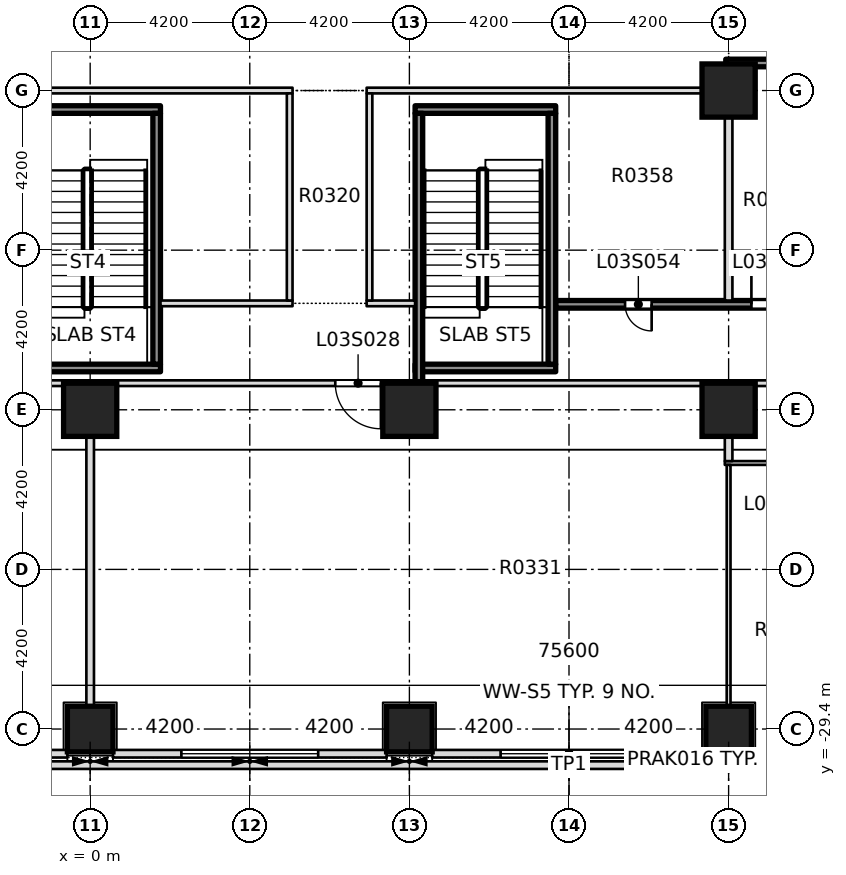
"""IFC4 building model, lengths in metres.
Left out: names, types, materials, properties, quantities, classifications, styles, units other than length and angle.
Written with IfcOpenShell. Run it as: python <this file> out.ifc"""

import sys

from ifc_helpers import new_model, si_unit, direction, frame, frame_2d, origin, origin_2d, place, context, subcontext, project, spatial, rectangle, extrude, element, fill, save


model = new_model("IFC4")
c1 = context("Model", 3, precision=1e-05, world=origin(), true_north=direction((0.0, 1.0)))
c2 = subcontext(c1, "Body", "Model", "MODEL_VIEW")
j1 = project(units=[si_unit("LENGTHUNIT", "METRE"), si_unit("PLANEANGLEUNIT", "RADIAN")], contexts=[c1])
p1 = place(None, origin())
s1 = spatial("IfcSite", under=j1, at=p1, CompositionType="ELEMENT")
p2 = place(p1, origin())
s2 = spatial("IfcBuilding", under=s1, at=p2, CompositionType="ELEMENT")
p3 = place(p2, frame((0.0, 0.0, 20.0)))
s3 = spatial("IfcBuildingStorey", under=s2, at=p3, CompositionType="ELEMENT", Elevation=20.0)
for number, where, z_axis, x_axis in (
    (1, (0.0, -21.0, -0.4), (0.0, 0.0, 1.0), (1.0, 0.0, 0.0)),
    (2, (8.4, -21.0, -0.4), (0.0, 0.0, 1.0), (1.0, 0.0, 0.0)),
    (3, (16.8, -21.0, -0.4), (0.0, 0.0, 1.0), (1.0, 0.0, 0.0)),
    (4, (16.8, -12.6, -0.4), (0.0, 0.0, 1.0), (1.0, 0.0, 0.0)),
):
    element("IfcColumn", number, at=place(p3, frame(where, z_axis=z_axis, x_axis=x_axis)), inside=s3, PredefinedType="COLUMN", context=c2, shape_type="SweptSolid", body=[
        extrude(rectangle(XDim=1.4, YDim=1.4, at=origin_2d()), origin(), (0.0, 0.0, 1.0), 5.0),
    ])
for number, where, z_axis, x_axis in (
    (5, (0.0, -29.4, 0.0), (0.0, 0.0, 1.0), (1.0, 0.0, 0.0)),
    (6, (8.4, -29.4, 0.0), (0.0, 0.0, 1.0), (1.0, 0.0, 0.0)),
    (7, (16.8, -29.4, 0.0), (0.0, 0.0, 1.0), (1.0, 0.0, 0.0)),
):
    element("IfcColumn", number, at=place(p3, frame(where, z_axis=z_axis, x_axis=x_axis)), inside=s3, PredefinedType="COLUMN", context=c2, shape_type="SweptSolid", body=[
        extrude(rectangle(XDim=1.2, YDim=1.2, at=origin_2d()), origin(), (0.0, 0.0, 1.0), 4.6),
    ])
p4 = place(p3, frame((-26.25, -30.35, 5.0), z_axis=(0.0, 0.0, 1.0), x_axis=(1.0, 0.0, 0.0)))
e8 = element("IfcWall", 8, at=p4, inside=s3, PredefinedType="PARAPET", context=c2, shape_type="SweptSolid", body=[
    extrude(rectangle(XDim=77.7, YDim=0.2, at=frame_2d((38.85, 0.0))), origin(), (0.0, 0.0, 1.0), 1.2),
])
p5 = place(p3, frame((16.7, -22.4, 0.0), z_axis=(0.0, 0.0, 1.0), x_axis=(1.0, 0.0, 0.0)))
e9 = element("IfcWall", 9, at=p5, inside=s3, PredefinedType="PARTITIONING", context=c2, shape_type="SweptSolid", body=[
    extrude(rectangle(XDim=8.6, YDim=0.1, at=frame_2d((4.3, 0.0))), origin(), (0.0, 0.0, 1.0), 4.6),
])
p6 = place(p5, frame((1.15, 0.0, 0.0)))
e10 = element("IfcOpeningElement", 10, at=p6, cuts=e9, PredefinedType="OPENING", context=c2, shape_type="SweptSolid", body=[
    extrude(rectangle(XDim=0.9, YDim=2.1, at=frame_2d((0.45, 1.05))), frame((0.0, 0.06, 0.0), z_axis=(0.0, -1.0, 0.0), x_axis=(1.0, 0.0, 0.0)), (0.0, 0.0, 1.0), 0.12),
])
p7 = place(p5, frame((4.15, 0.0, 0.0)))
e11 = element("IfcOpeningElement", 11, at=p7, cuts=e9, PredefinedType="OPENING", context=c2, shape_type="SweptSolid", body=[
    extrude(rectangle(XDim=0.9, YDim=2.1, at=frame_2d((0.45, 1.05))), frame((0.0, 0.06, 0.0), z_axis=(0.0, -1.0, 0.0), x_axis=(1.0, 0.0, 0.0)), (0.0, 0.0, 1.0), 0.12),
])
p8 = place(p5, frame((6.85, 0.0, 0.0)))
e12 = element("IfcOpeningElement", 12, at=p8, cuts=e9, PredefinedType="OPENING", context=c2, shape_type="SweptSolid", body=[
    extrude(rectangle(XDim=0.9, YDim=2.1, at=frame_2d((0.45, 1.05))), frame((0.0, 0.06, 0.0), z_axis=(0.0, -1.0, 0.0), x_axis=(1.0, 0.0, 0.0)), (0.0, 0.0, 1.0), 0.12),
])
p9 = place(p3, frame((-25.75, -20.3, 0.0), z_axis=(0.0, 0.0, 1.0), x_axis=(1.0, 0.0, 0.0)))
e13 = element("IfcWall", 13, at=p9, inside=s3, PredefinedType="PARTITIONING", context=c2, shape_type="SweptSolid", body=[
    extrude(rectangle(XDim=59.425, YDim=0.15, at=frame_2d((29.712, 0.0))), origin(), (0.0, 0.0, 1.0), 4.6),
])
p10 = place(p9, frame((4.2, 0.0, 0.0)))
e14 = element("IfcOpeningElement", 14, at=p10, cuts=e13, PredefinedType="OPENING", context=c2, shape_type="SweptSolid", body=[
    extrude(rectangle(XDim=1.1, YDim=2.1, at=frame_2d((0.55, 1.05))), frame((0.0, 0.085, 0.0), z_axis=(0.0, -1.0, 0.0), x_axis=(1.0, 0.0, 0.0)), (0.0, 0.0, 1.0), 0.17),
])
p11 = place(p9, frame((12.35, 0.0, 0.0)))
e15 = element("IfcOpeningElement", 15, at=p11, cuts=e13, PredefinedType="OPENING", context=c2, shape_type="SweptSolid", body=[
    extrude(rectangle(XDim=0.9, YDim=2.1, at=frame_2d((0.45, 1.05))), frame((0.0, 0.085, 0.0), z_axis=(0.0, -1.0, 0.0), x_axis=(1.0, 0.0, 0.0)), (0.0, 0.0, 1.0), 0.17),
])
p12 = place(p9, frame((21.1, 0.0, 0.0)))
e16 = element("IfcOpeningElement", 16, at=p12, cuts=e13, PredefinedType="OPENING", context=c2, shape_type="SweptSolid", body=[
    extrude(rectangle(XDim=0.9, YDim=2.1, at=frame_2d((0.45, 1.05))), frame((0.0, 0.085, 0.0), z_axis=(0.0, -1.0, 0.0), x_axis=(1.0, 0.0, 0.0)), (0.0, 0.0, 1.0), 0.17),
])
p13 = place(p9, frame((32.2, 0.0, 0.0)))
e17 = element("IfcOpeningElement", 17, at=p13, cuts=e13, PredefinedType="OPENING", context=c2, shape_type="SweptSolid", body=[
    extrude(rectangle(XDim=1.2, YDim=2.1, at=frame_2d((0.6, 1.05))), frame((0.0, 0.085, 0.0), z_axis=(0.0, -1.0, 0.0), x_axis=(1.0, 0.0, 0.0)), (0.0, 0.0, 1.0), 0.17),
])
p14 = place(p9, frame((46.2, 0.0, 0.0)))
e18 = element("IfcOpeningElement", 18, at=p14, cuts=e13, PredefinedType="OPENING", context=c2, shape_type="SweptSolid", body=[
    extrude(rectangle(XDim=1.1, YDim=2.1, at=frame_2d((0.55, 1.05))), frame((0.0, 0.085, 0.0), z_axis=(0.0, -1.0, 0.0), x_axis=(1.0, 0.0, 0.0)), (0.0, 0.0, 1.0), 0.17),
])
p15 = place(p9, frame((54.7, 0.0, 0.0)))
e19 = element("IfcOpeningElement", 19, at=p15, cuts=e13, PredefinedType="OPENING", context=c2, shape_type="SweptSolid", body=[
    extrude(rectangle(XDim=0.9, YDim=2.1, at=frame_2d((0.45, 1.05))), frame((0.0, 0.085, 0.0), z_axis=(0.0, -1.0, 0.0), x_axis=(1.0, 0.0, 0.0)), (0.0, 0.0, 1.0), 0.17),
])
p16 = place(p3, frame((1.85, -18.2, 0.0), z_axis=(0.0, 0.0, 1.0), x_axis=(1.0, 0.0, 0.0)))
e20 = element("IfcWall", 20, at=p16, inside=s3, PredefinedType="PARTITIONING", context=c2, shape_type="SweptSolid", body=[
    extrude(rectangle(XDim=3.475, YDim=0.15, at=frame_2d((1.737, 0.0))), origin(), (0.0, 0.0, 1.0), 4.6),
])
p17 = place(p3, frame((7.275, -18.2, 0.0), z_axis=(0.0, 0.0, 1.0), x_axis=(1.0, 0.0, 0.0)))
e21 = element("IfcWall", 21, at=p17, inside=s3, PredefinedType="PARTITIONING", context=c2, shape_type="SweptSolid", body=[
    extrude(rectangle(XDim=1.275, YDim=0.15, at=frame_2d((0.638, 0.0))), origin(), (0.0, 0.0, 1.0), 4.6),
])
p18 = place(p3, frame((12.25, -18.225, 0.0), z_axis=(0.0, 0.0, 1.0), x_axis=(1.0, 0.0, 0.0)))
e22 = element("IfcWall", 22, at=p18, inside=s3, PredefinedType="SOLIDWALL", context=c2, shape_type="SweptSolid", body=[
    extrude(rectangle(XDim=24.0, YDim=0.2, at=frame_2d((12.0, 0.0))), origin(), (0.0, 0.0, 1.0), 4.6),
])
p19 = place(p18, frame((5.15, 0.0, 0.0)))
e23 = element("IfcOpeningElement", 23, at=p19, cuts=e22, PredefinedType="OPENING", context=c2, shape_type="SweptSolid", body=[
    extrude(rectangle(XDim=1.2, YDim=2.1, at=frame_2d((0.6, 1.05))), frame((0.0, 0.11, 0.0), z_axis=(0.0, -1.0, 0.0), x_axis=(1.0, 0.0, 0.0)), (0.0, 0.0, 1.0), 0.22),
])
p20 = place(p18, frame((14.637, 0.0, 0.0)))
e24 = element("IfcOpeningElement", 24, at=p20, cuts=e22, PredefinedType="OPENING", context=c2, shape_type="SweptSolid", body=[
    extrude(rectangle(XDim=0.9, YDim=2.1, at=frame_2d((0.45, 1.05))), frame((0.0, 0.11, 0.0), z_axis=(0.0, -1.0, 0.0), x_axis=(1.0, 0.0, 0.0)), (0.0, 0.0, 1.0), 0.22),
])
p21 = place(p18, frame((18.913, 0.0, 0.0)))
e25 = element("IfcOpeningElement", 25, at=p21, cuts=e22, PredefinedType="OPENING", context=c2, shape_type="SweptSolid", body=[
    extrude(rectangle(XDim=0.9, YDim=2.1, at=frame_2d((0.45, 1.05))), frame((0.0, 0.11, 0.0), z_axis=(0.0, -1.0, 0.0), x_axis=(1.0, 0.0, 0.0)), (0.0, 0.0, 1.0), 0.22),
])
p22 = place(p18, frame((22.25, 0.0, 0.0)))
e26 = element("IfcOpeningElement", 26, at=p22, cuts=e22, PredefinedType="OPENING", context=c2, shape_type="SweptSolid", body=[
    extrude(rectangle(XDim=0.9, YDim=2.1, at=frame_2d((0.45, 1.05))), frame((0.0, 0.11, 0.0), z_axis=(0.0, -1.0, 0.0), x_axis=(1.0, 0.0, 0.0)), (0.0, 0.0, 1.0), 0.22),
])
p23 = place(p18, frame((1.825, 0.0, 0.0)))
e27 = element("IfcOpeningElement", 27, at=p23, cuts=e22, PredefinedType="OPENING", context=c2, shape_type="SweptSolid", body=[
    extrude(rectangle(XDim=0.7, YDim=2.1, at=frame_2d((0.35, 1.05))), frame((0.0, 0.11, 0.0), z_axis=(0.0, -1.0, 0.0), x_axis=(1.0, 0.0, 0.0)), (0.0, 0.0, 1.0), 0.22),
])
p24 = place(p3, frame((-5.325, -12.6, 0.0), z_axis=(0.0, 0.0, 1.0), x_axis=(1.0, 0.0, 0.0)))
e28 = element("IfcWall", 28, at=p24, inside=s3, PredefinedType="PARTITIONING", context=c2, shape_type="SweptSolid", body=[
    extrude(rectangle(XDim=10.65, YDim=0.15, at=frame_2d((5.325, 0.0))), origin(), (0.0, 0.0, 1.0), 4.6),
])
p25 = place(p3, frame((7.275, -12.6, 0.0), z_axis=(0.0, 0.0, 1.0), x_axis=(1.0, 0.0, 0.0)))
e29 = element("IfcWall", 29, at=p25, inside=s3, PredefinedType="PARTITIONING", context=c2, shape_type="SweptSolid", body=[
    extrude(rectangle(XDim=9.625, YDim=0.15, at=frame_2d((4.812, 0.0))), origin(), (0.0, 0.0, 1.0), 4.6),
])
p26 = place(p3, frame((16.725, -11.875, 0.0), z_axis=(0.0, 0.0, 1.0), x_axis=(1.0, 0.0, 0.0)))
e30 = element("IfcWall", 30, at=p26, inside=s3, PredefinedType="SOLIDWALL", context=c2, shape_type="SweptSolid", body=[
    extrude(rectangle(XDim=8.575, YDim=0.2, at=frame_2d((4.288, 0.0))), origin(), (0.0, 0.0, 1.0), 4.6),
])
p27 = place(p3, frame((0.0, -29.95, 0.0), z_axis=(0.0, 0.0, 1.0), x_axis=(0.0, 1.0, 0.0)))
e31 = element("IfcWall", 31, at=p27, inside=s3, PredefinedType="PARTITIONING", context=c2, shape_type="SweptSolid", body=[
    extrude(rectangle(XDim=9.575, YDim=0.2, at=frame_2d((4.788, 0.0))), origin(), (0.0, 0.0, 1.0), 4.6),
])
for number, where, z_axis, x_axis in (
    (32, (5.25, -18.125, 0.0), (0.0, 0.0, 1.0), (0.0, 1.0, 0.0)),
    (33, (7.35, -18.125, 0.0), (0.0, 0.0, 1.0), (0.0, 1.0, 0.0)),
):
    element("IfcWall", number, at=place(p3, frame(where, z_axis=z_axis, x_axis=x_axis)), inside=s3, PredefinedType="PARTITIONING", context=c2, shape_type="SweptSolid", body=[
        extrude(rectangle(XDim=5.45, YDim=0.15, at=frame_2d((2.725, 0.0))), origin(), (0.0, 0.0, 1.0), 4.6),
    ])
p28 = place(p3, frame((16.8, -29.95, 0.0), z_axis=(0.0, 0.0, 1.0), x_axis=(0.0, 1.0, 0.0)))
e34 = element("IfcWall", 34, at=p28, inside=s3, PredefinedType="PARTITIONING", context=c2, shape_type="SweptSolid", body=[
    extrude(rectangle(XDim=7.5, YDim=0.1, at=frame_2d((3.75, 0.0))), origin(), (0.0, 0.0, 1.0), 4.6),
])
p29 = place(p3, frame((16.8, -22.35, 0.0), z_axis=(0.0, 0.0, 1.0), x_axis=(0.0, 1.0, 0.0)))
e35 = element("IfcWall", 35, at=p29, inside=s3, PredefinedType="PARTITIONING", context=c2, shape_type="SweptSolid", body=[
    extrude(rectangle(XDim=1.975, YDim=0.2, at=frame_2d((0.988, 0.0))), origin(), (0.0, 0.0, 1.0), 4.6),
])
p30 = place(p3, frame((16.8, -18.125, 0.0), z_axis=(0.0, 0.0, 1.0), x_axis=(0.0, 1.0, 0.0)))
e36 = element("IfcWall", 36, at=p30, inside=s3, PredefinedType="PARTITIONING", context=c2, shape_type="SweptSolid", body=[
    extrude(rectangle(XDim=5.45, YDim=0.2, at=frame_2d((2.725, 0.0))), origin(), (0.0, 0.0, 1.0), 4.6),
])
p31 = place(p3, frame((16.8, -12.525, 0.0), z_axis=(0.0, 0.0, 1.0), x_axis=(0.0, 1.0, 0.0)))
e37 = element("IfcWall", 37, at=p31, inside=s3, PredefinedType="PARTITIONING", context=c2, shape_type="SweptSolid", body=[
    extrude(rectangle(XDim=0.55, YDim=0.15, at=frame_2d((0.275, 0.0))), origin(), (0.0, 0.0, 1.0), 4.6),
])
p32 = place(p3, frame((-7.8, -30.05, 0.0), z_axis=(0.0, 0.0, 1.0), x_axis=(1.0, 0.0, 0.0)))
e38 = element("IfcWall", 38, at=p32, inside=s3, PredefinedType="STANDARD", context=c2, shape_type="SweptSolid", body=[
    extrude(rectangle(XDim=7.2, YDim=0.2, at=frame_2d((3.6, 0.0))), origin(), (0.0, 0.0, 1.0), 4.6),
])
p33 = place(p32, frame((1.8, 0.0, 0.9)))
e39 = element("IfcOpeningElement", 39, at=p33, cuts=e38, PredefinedType="OPENING", context=c2, shape_type="SweptSolid", body=[
    extrude(rectangle(XDim=3.6, YDim=2.8, at=frame_2d((1.8, 1.4))), frame((0.0, 0.11, 0.0), z_axis=(0.0, -1.0, 0.0), x_axis=(1.0, 0.0, 0.0)), (0.0, 0.0, 1.0), 0.22),
])
p34 = place(p3, frame((0.6, -30.05, 0.0), z_axis=(0.0, 0.0, 1.0), x_axis=(1.0, 0.0, 0.0)))
e40 = element("IfcWall", 40, at=p34, inside=s3, PredefinedType="STANDARD", context=c2, shape_type="SweptSolid", body=[
    extrude(rectangle(XDim=7.2, YDim=0.2, at=frame_2d((3.6, 0.0))), origin(), (0.0, 0.0, 1.0), 4.6),
])
p35 = place(p34, frame((1.8, 0.0, 0.9)))
e41 = element("IfcOpeningElement", 41, at=p35, cuts=e40, PredefinedType="OPENING", context=c2, shape_type="SweptSolid", body=[
    extrude(rectangle(XDim=3.6, YDim=2.8, at=frame_2d((1.8, 1.4))), frame((0.0, 0.11, 0.0), z_axis=(0.0, -1.0, 0.0), x_axis=(1.0, 0.0, 0.0)), (0.0, 0.0, 1.0), 0.22),
])
p36 = place(p3, frame((9.0, -30.05, 0.0), z_axis=(0.0, 0.0, 1.0), x_axis=(1.0, 0.0, 0.0)))
e42 = element("IfcWall", 42, at=p36, inside=s3, PredefinedType="STANDARD", context=c2, shape_type="SweptSolid", body=[
    extrude(rectangle(XDim=7.2, YDim=0.2, at=frame_2d((3.6, 0.0))), origin(), (0.0, 0.0, 1.0), 4.6),
])
p37 = place(p36, frame((1.8, 0.0, 0.9)))
e43 = element("IfcOpeningElement", 43, at=p37, cuts=e42, PredefinedType="OPENING", context=c2, shape_type="SweptSolid", body=[
    extrude(rectangle(XDim=3.6, YDim=2.8, at=frame_2d((1.8, 1.4))), frame((0.0, 0.11, 0.0), z_axis=(0.0, -1.0, 0.0), x_axis=(1.0, 0.0, 0.0)), (0.0, 0.0, 1.0), 0.22),
])
p38 = place(p3, frame((17.4, -30.05, 0.0), z_axis=(0.0, 0.0, 1.0), x_axis=(1.0, 0.0, 0.0)))
e44 = element("IfcWall", 44, at=p38, inside=s3, PredefinedType="STANDARD", context=c2, shape_type="SweptSolid", body=[
    extrude(rectangle(XDim=7.2, YDim=0.2, at=frame_2d((3.6, 0.0))), origin(), (0.0, 0.0, 1.0), 4.6),
])
p39 = place(p38, frame((1.8, 0.0, 0.9)))
e45 = element("IfcOpeningElement", 45, at=p39, cuts=e44, PredefinedType="OPENING", context=c2, shape_type="SweptSolid", body=[
    extrude(rectangle(XDim=3.6, YDim=2.8, at=frame_2d((1.8, 1.4))), frame((0.0, 0.11, 0.0), z_axis=(0.0, -1.0, 0.0), x_axis=(1.0, 0.0, 0.0)), (0.0, 0.0, 1.0), 0.22),
])
for number, where, z_axis, x_axis in (
    (46, (-1.85, -19.9, 0.0), (0.0, 0.0, 1.0), (1.0, 0.0, 0.0)),
    (47, (-1.85, -13.1, 0.0), (0.0, 0.0, 1.0), (1.0, 0.0, 0.0)),
):
    element("IfcWall", number, at=place(p3, frame(where, z_axis=z_axis, x_axis=x_axis)), inside=s3, PredefinedType="SOLIDWALL", context=c2, shape_type="SweptSolid", body=[
        extrude(rectangle(XDim=3.7, YDim=0.2, at=frame_2d((1.85, 0.0))), origin(), (0.0, 0.0, 1.0), 4.6),
    ])
p40 = place(p3, frame((1.75, -19.8, 0.0), z_axis=(0.0, 0.0, 1.0), x_axis=(0.0, 1.0, 0.0)))
e48 = element("IfcWall", 48, at=p40, inside=s3, PredefinedType="SOLIDWALL", context=c2, shape_type="SweptSolid", body=[
    extrude(rectangle(XDim=6.6, YDim=0.2, at=frame_2d((3.3, 0.0))), origin(), (0.0, 0.0, 1.0), 4.6),
])
for number, where, z_axis, x_axis in (
    (49, (8.55, -19.9, 0.0), (0.0, 0.0, 1.0), (1.0, 0.0, 0.0)),
    (50, (8.55, -13.1, 0.0), (0.0, 0.0, 1.0), (1.0, 0.0, 0.0)),
):
    element("IfcWall", number, at=place(p3, frame(where, z_axis=z_axis, x_axis=x_axis)), inside=s3, PredefinedType="SOLIDWALL", context=c2, shape_type="SweptSolid", body=[
        extrude(rectangle(XDim=3.7, YDim=0.2, at=frame_2d((1.85, 0.0))), origin(), (0.0, 0.0, 1.0), 4.6),
    ])
p41 = place(p3, frame((8.65, -20.3, 0.0), z_axis=(0.0, 0.0, 1.0), x_axis=(0.0, 1.0, 0.0)))
e51 = element("IfcWall", 51, at=p41, inside=s3, PredefinedType="SOLIDWALL", context=c2, shape_type="SweptSolid", body=[
    extrude(rectangle(XDim=7.1, YDim=0.2, at=frame_2d((3.55, 0.0))), origin(), (0.0, 0.0, 1.0), 4.6),
])
p42 = place(p3, frame((12.15, -19.8, 0.0), z_axis=(0.0, 0.0, 1.0), x_axis=(0.0, 1.0, 0.0)))
e52 = element("IfcWall", 52, at=p42, inside=s3, PredefinedType="SOLIDWALL", context=c2, shape_type="SweptSolid", body=[
    extrude(rectangle(XDim=6.6, YDim=0.2, at=frame_2d((3.3, 0.0))), origin(), (0.0, 0.0, 1.0), 4.6),
])
p43 = place(p19, origin())
e53 = element("IfcDoor", 53, at=p43, inside=s3, OperationType="SINGLE_SWING_LEFT", PredefinedType="DOOR", context=c2, shape_type="SweptSolid", body=[
    extrude(rectangle(XDim=1.2, YDim=2.1, at=frame_2d((0.6, 1.05))), frame((0.0, 0.025, 0.0), z_axis=(0.0, -1.0, 0.0), x_axis=(1.0, 0.0, 0.0)), (0.0, 0.0, 1.0), 0.05),
])
fill(e23, e53)
p44 = place(p13, origin())
e54 = element("IfcDoor", 54, at=p44, inside=s3, OperationType="SINGLE_SWING_LEFT", PredefinedType="DOOR", context=c2, shape_type="SweptSolid", body=[
    extrude(rectangle(XDim=1.2, YDim=2.1, at=frame_2d((0.6, 1.05))), frame((0.0, 0.025, 0.0), z_axis=(0.0, -1.0, 0.0), x_axis=(1.0, 0.0, 0.0)), (0.0, 0.0, 1.0), 0.05),
])
fill(e17, e54)
p45 = place(p23, origin())
e55 = element("IfcDoor", 55, at=p45, inside=s3, OperationType="SINGLE_SWING_LEFT", PredefinedType="DOOR", context=c2, shape_type="SweptSolid", body=[
    extrude(rectangle(XDim=0.7, YDim=2.1, at=frame_2d((0.35, 1.05))), frame((0.0, 0.025, 0.0), z_axis=(0.0, -1.0, 0.0), x_axis=(1.0, 0.0, 0.0)), (0.0, 0.0, 1.0), 0.05),
])
fill(e27, e55)
p46 = place(p35, origin())
e56 = element("IfcWindow", 56, at=p46, inside=s3, PartitioningType="SINGLE_PANEL", PredefinedType="WINDOW", context=c2, shape_type="SweptSolid", body=[
    extrude(rectangle(XDim=3.6, YDim=2.8, at=frame_2d((1.8, 1.4))), frame((0.0, 0.03, 0.0), z_axis=(0.0, -1.0, 0.0), x_axis=(1.0, 0.0, 0.0)), (0.0, 0.0, 1.0), 0.06),
])
fill(e41, e56)
p47 = place(p37, origin())
e57 = element("IfcWindow", 57, at=p47, inside=s3, PartitioningType="SINGLE_PANEL", PredefinedType="WINDOW", context=c2, shape_type="SweptSolid", body=[
    extrude(rectangle(XDim=3.6, YDim=2.8, at=frame_2d((1.8, 1.4))), frame((0.0, 0.03, 0.0), z_axis=(0.0, -1.0, 0.0), x_axis=(1.0, 0.0, 0.0)), (0.0, 0.0, 1.0), 0.06),
])
fill(e43, e57)
save(model, sys.argv[1])
